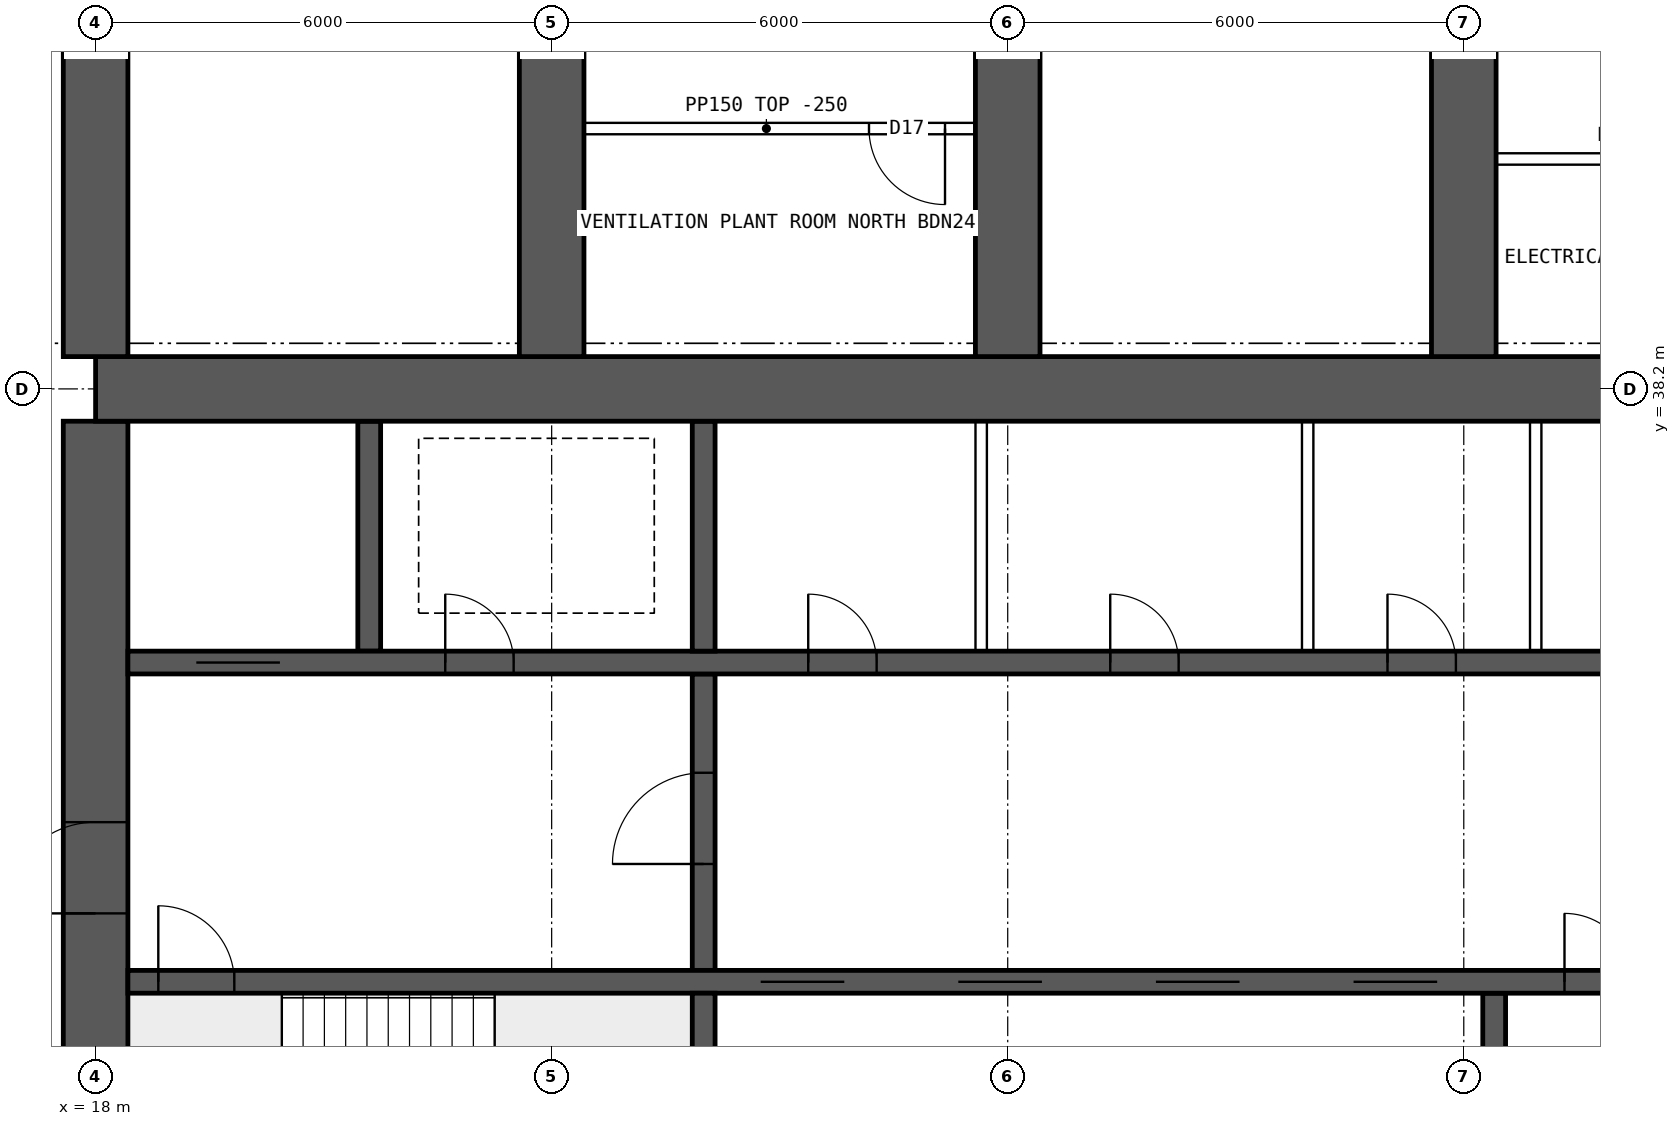
"""IFC4 building model, lengths in metres.
Left out: names, types, materials, properties, quantities, classifications, styles, units other than length and angle.
Written with IfcOpenShell. Run it as: python <this file> out.ifc"""

import sys

from ifc_helpers import new_model, si_unit, direction, frame, frame_2d, origin, place, context, subcontext, project, spatial, rectangle, extrude, element, fill, save


model = new_model("IFC4")
c1 = context("Model", 3, precision=1e-05, world=origin(), true_north=direction((0.0, 1.0)))
c2 = subcontext(c1, "Body", "Model", "MODEL_VIEW")
j1 = project(units=[si_unit("LENGTHUNIT", "METRE"), si_unit("PLANEANGLEUNIT", "RADIAN")], contexts=[c1])
p1 = place(None, origin())
s1 = spatial("IfcSite", under=j1, at=p1, CompositionType="ELEMENT")
p2 = place(p1, origin())
s2 = spatial("IfcBuilding", under=s1, at=p2, CompositionType="ELEMENT")
p3 = place(p2, frame((0.0, 0.0, 152.35)))
s3 = spatial("IfcBuildingStorey", under=s2, at=p3, CompositionType="ELEMENT", Elevation=152.35)
p4 = place(p3, frame((18.0, 38.2, 0.0), z_axis=(0.0, 0.0, 1.0), x_axis=(1.0, 0.0, 0.0)))
e1 = element("IfcWall", 1, at=p4, inside=s3, PredefinedType="SHEAR", context=c2, shape_type="SweptSolid", body=[
    extrude(rectangle(XDim=48.0, YDim=0.85, at=frame_2d((24.0, 0.0))), origin(), (0.0, 0.0, 1.0), 3.75),
])
p5 = place(p3, frame((18.0, 26.225, 0.0), z_axis=(0.0, 0.0, 1.0), x_axis=(0.0, 1.0, 0.0)))
e2 = element("IfcWall", 2, at=p5, inside=s3, PredefinedType="SHEAR", context=c2, shape_type="SweptSolid", body=[
    extrude(rectangle(XDim=11.55, YDim=0.85, at=frame_2d((5.775, 0.0))), origin(), (0.0, 0.0, 1.0), 3.75),
])
p6 = place(p5, frame((5.075, 0.0, 0.0)))
e3 = element("IfcOpeningElement", 3, at=p6, cuts=e2, PredefinedType="OPENING", context=c2, shape_type="SweptSolid", body=[
    extrude(rectangle(XDim=1.2, YDim=2.1, at=frame_2d((0.6, 1.05))), frame((0.0, 0.435, 0.0), z_axis=(0.0, -1.0, 0.0), x_axis=(1.0, 0.0, 0.0)), (0.0, 0.0, 1.0), 0.87),
])
p7 = place(p3, frame((18.425, 30.4, 0.0), z_axis=(0.0, 0.0, 1.0), x_axis=(1.0, 0.0, 0.0)))
e4 = element("IfcWall", 4, at=p7, inside=s3, PredefinedType="SHEAR", context=c2, shape_type="SweptSolid", body=[
    extrude(rectangle(XDim=47.15, YDim=0.3, at=frame_2d((23.575, 0.0))), origin(), (0.0, 0.0, 1.0), 3.75),
])
p8 = place(p7, frame((0.4, 0.0, 0.0)))
e5 = element("IfcOpeningElement", 5, at=p8, cuts=e4, PredefinedType="OPENING", context=c2, shape_type="SweptSolid", body=[
    extrude(rectangle(XDim=1.0, YDim=2.1, at=frame_2d((0.5, 1.05))), frame((0.0, 0.16, 0.0), z_axis=(0.0, -1.0, 0.0), x_axis=(1.0, 0.0, 0.0)), (0.0, 0.0, 1.0), 0.32),
])
p9 = place(p7, frame((45.75, 0.0, 0.0)))
e6 = element("IfcOpeningElement", 6, at=p9, cuts=e4, PredefinedType="OPENING", context=c2, shape_type="SweptSolid", body=[
    extrude(rectangle(XDim=1.0, YDim=2.1, at=frame_2d((0.5, 1.05))), frame((0.0, 0.16, 0.0), z_axis=(0.0, -1.0, 0.0), x_axis=(1.0, 0.0, 0.0)), (0.0, 0.0, 1.0), 0.32),
])
p10 = place(p7, frame((8.325, 0.0, 0.0)))
e7 = element("IfcOpeningElement", 7, at=p10, cuts=e4, PredefinedType="OPENING", context=c2, shape_type="SweptSolid", body=[
    extrude(rectangle(XDim=1.1, YDim=2.1, at=frame_2d((0.55, 1.05))), frame((0.0, 0.16, 0.0), z_axis=(0.0, -1.0, 0.0), x_axis=(1.0, 0.0, 0.0)), (0.0, 0.0, 1.0), 0.32),
])
p11 = place(p7, frame((10.925, 0.0, 0.0)))
e8 = element("IfcOpeningElement", 8, at=p11, cuts=e4, PredefinedType="OPENING", context=c2, shape_type="SweptSolid", body=[
    extrude(rectangle(XDim=1.1, YDim=2.1, at=frame_2d((0.55, 1.05))), frame((0.0, 0.16, 0.0), z_axis=(0.0, -1.0, 0.0), x_axis=(1.0, 0.0, 0.0)), (0.0, 0.0, 1.0), 0.32),
])
p12 = place(p7, frame((13.525, 0.0, 0.0)))
e9 = element("IfcOpeningElement", 9, at=p12, cuts=e4, PredefinedType="OPENING", context=c2, shape_type="SweptSolid", body=[
    extrude(rectangle(XDim=1.1, YDim=2.1, at=frame_2d((0.55, 1.05))), frame((0.0, 0.16, 0.0), z_axis=(0.0, -1.0, 0.0), x_axis=(1.0, 0.0, 0.0)), (0.0, 0.0, 1.0), 0.32),
])
p13 = place(p7, frame((16.125, 0.0, 0.0)))
e10 = element("IfcOpeningElement", 10, at=p13, cuts=e4, PredefinedType="OPENING", context=c2, shape_type="SweptSolid", body=[
    extrude(rectangle(XDim=1.1, YDim=2.1, at=frame_2d((0.55, 1.05))), frame((0.0, 0.16, 0.0), z_axis=(0.0, -1.0, 0.0), x_axis=(1.0, 0.0, 0.0)), (0.0, 0.0, 1.0), 0.32),
])
p14 = place(p7, frame((18.9, 0.0, 0.0)))
e11 = element("IfcOpeningElement", 11, at=p14, cuts=e4, PredefinedType="OPENING", context=c2, shape_type="SweptSolid", body=[
    extrude(rectangle(XDim=0.9, YDim=2.1, at=frame_2d((0.45, 1.05))), frame((0.0, 0.16, 0.0), z_axis=(0.0, -1.0, 0.0), x_axis=(1.0, 0.0, 0.0)), (0.0, 0.0, 1.0), 0.32),
])
p15 = place(p7, frame((30.192, 0.0, 0.0)))
e12 = element("IfcOpeningElement", 12, at=p15, cuts=e4, PredefinedType="OPENING", context=c2, shape_type="SweptSolid", body=[
    extrude(rectangle(XDim=1.1, YDim=2.1, at=frame_2d((0.55, 1.05))), frame((0.0, 0.16, 0.0), z_axis=(0.0, -1.0, 0.0), x_axis=(1.0, 0.0, 0.0)), (0.0, 0.0, 1.0), 0.32),
])
p16 = place(p7, frame((33.725, 0.0, 0.0)))
e13 = element("IfcOpeningElement", 13, at=p16, cuts=e4, PredefinedType="OPENING", context=c2, shape_type="SweptSolid", body=[
    extrude(rectangle(XDim=1.1, YDim=2.1, at=frame_2d((0.55, 1.05))), frame((0.0, 0.16, 0.0), z_axis=(0.0, -1.0, 0.0), x_axis=(1.0, 0.0, 0.0)), (0.0, 0.0, 1.0), 0.32),
])
p17 = place(p7, frame((37.258, 0.0, 0.0)))
e14 = element("IfcOpeningElement", 14, at=p17, cuts=e4, PredefinedType="OPENING", context=c2, shape_type="SweptSolid", body=[
    extrude(rectangle(XDim=1.1, YDim=2.1, at=frame_2d((0.55, 1.05))), frame((0.0, 0.16, 0.0), z_axis=(0.0, -1.0, 0.0), x_axis=(1.0, 0.0, 0.0)), (0.0, 0.0, 1.0), 0.32),
])
p18 = place(p3, frame((18.425, 34.6, 0.0), z_axis=(0.0, 0.0, 1.0), x_axis=(1.0, 0.0, 0.0)))
e15 = element("IfcWall", 15, at=p18, inside=s3, PredefinedType="SHEAR", context=c2, shape_type="SweptSolid", body=[
    extrude(rectangle(XDim=47.15, YDim=0.3, at=frame_2d((23.575, 0.0))), origin(), (0.0, 0.0, 1.0), 3.75),
])
p19 = place(p18, frame((0.9, 0.0, 0.0)))
e16 = element("IfcOpeningElement", 16, at=p19, cuts=e15, PredefinedType="OPENING", context=c2, shape_type="SweptSolid", body=[
    extrude(rectangle(XDim=1.1, YDim=2.1, at=frame_2d((0.55, 1.05))), frame((0.0, 0.16, 0.0), z_axis=(0.0, -1.0, 0.0), x_axis=(1.0, 0.0, 0.0)), (0.0, 0.0, 1.0), 0.32),
])
p20 = place(p18, frame((45.15, 0.0, 0.0)))
e17 = element("IfcOpeningElement", 17, at=p20, cuts=e15, PredefinedType="OPENING", context=c2, shape_type="SweptSolid", body=[
    extrude(rectangle(XDim=1.1, YDim=2.1, at=frame_2d((0.55, 1.05))), frame((0.0, 0.16, 0.0), z_axis=(0.0, -1.0, 0.0), x_axis=(1.0, 0.0, 0.0)), (0.0, 0.0, 1.0), 0.32),
])
p21 = place(p18, frame((4.175, 0.0, 0.0)))
e18 = element("IfcOpeningElement", 18, at=p21, cuts=e15, PredefinedType="OPENING", context=c2, shape_type="SweptSolid", body=[
    extrude(rectangle(XDim=0.9, YDim=2.1, at=frame_2d((0.45, 1.05))), frame((0.0, 0.16, 0.0), z_axis=(0.0, -1.0, 0.0), x_axis=(1.0, 0.0, 0.0)), (0.0, 0.0, 1.0), 0.32),
])
p22 = place(p18, frame((42.075, 0.0, 0.0)))
e19 = element("IfcOpeningElement", 19, at=p22, cuts=e15, PredefinedType="OPENING", context=c2, shape_type="SweptSolid", body=[
    extrude(rectangle(XDim=0.9, YDim=2.1, at=frame_2d((0.45, 1.05))), frame((0.0, 0.16, 0.0), z_axis=(0.0, -1.0, 0.0), x_axis=(1.0, 0.0, 0.0)), (0.0, 0.0, 1.0), 0.32),
])
p23 = place(p18, frame((8.95, 0.0, 0.0)))
e20 = element("IfcOpeningElement", 20, at=p23, cuts=e15, PredefinedType="OPENING", context=c2, shape_type="SweptSolid", body=[
    extrude(rectangle(XDim=0.9, YDim=2.1, at=frame_2d((0.45, 1.05))), frame((0.0, 0.16, 0.0), z_axis=(0.0, -1.0, 0.0), x_axis=(1.0, 0.0, 0.0)), (0.0, 0.0, 1.0), 0.32),
])
p24 = place(p18, frame((12.924, 0.0, 0.0)))
e21 = element("IfcOpeningElement", 21, at=p24, cuts=e15, PredefinedType="OPENING", context=c2, shape_type="SweptSolid", body=[
    extrude(rectangle(XDim=0.9, YDim=2.1, at=frame_2d((0.45, 1.05))), frame((0.0, 0.16, 0.0), z_axis=(0.0, -1.0, 0.0), x_axis=(1.0, 0.0, 0.0)), (0.0, 0.0, 1.0), 0.32),
])
p25 = place(p18, frame((16.571, 0.0, 0.0)))
e22 = element("IfcOpeningElement", 22, at=p25, cuts=e15, PredefinedType="OPENING", context=c2, shape_type="SweptSolid", body=[
    extrude(rectangle(XDim=0.9, YDim=2.1, at=frame_2d((0.45, 1.05))), frame((0.0, 0.16, 0.0), z_axis=(0.0, -1.0, 0.0), x_axis=(1.0, 0.0, 0.0)), (0.0, 0.0, 1.0), 0.32),
])
p26 = place(p18, frame((20.33, 0.0, 0.0)))
e23 = element("IfcOpeningElement", 23, at=p26, cuts=e15, PredefinedType="OPENING", context=c2, shape_type="SweptSolid", body=[
    extrude(rectangle(XDim=0.9, YDim=2.1, at=frame_2d((0.45, 1.05))), frame((0.0, 0.16, 0.0), z_axis=(0.0, -1.0, 0.0), x_axis=(1.0, 0.0, 0.0)), (0.0, 0.0, 1.0), 0.32),
])
p27 = place(p18, frame((24.736, 0.0, 0.0)))
e24 = element("IfcOpeningElement", 24, at=p27, cuts=e15, PredefinedType="OPENING", context=c2, shape_type="SweptSolid", body=[
    extrude(rectangle(XDim=0.9, YDim=2.1, at=frame_2d((0.45, 1.05))), frame((0.0, 0.16, 0.0), z_axis=(0.0, -1.0, 0.0), x_axis=(1.0, 0.0, 0.0)), (0.0, 0.0, 1.0), 0.32),
])
p28 = place(p18, frame((27.533, 0.0, 0.0)))
e25 = element("IfcOpeningElement", 25, at=p28, cuts=e15, PredefinedType="OPENING", context=c2, shape_type="SweptSolid", body=[
    extrude(rectangle(XDim=0.9, YDim=2.1, at=frame_2d((0.45, 1.05))), frame((0.0, 0.16, 0.0), z_axis=(0.0, -1.0, 0.0), x_axis=(1.0, 0.0, 0.0)), (0.0, 0.0, 1.0), 0.32),
])
p29 = place(p18, frame((29.703, 0.0, 0.0)))
e26 = element("IfcOpeningElement", 26, at=p29, cuts=e15, PredefinedType="OPENING", context=c2, shape_type="SweptSolid", body=[
    extrude(rectangle(XDim=0.9, YDim=2.1, at=frame_2d((0.45, 1.05))), frame((0.0, 0.16, 0.0), z_axis=(0.0, -1.0, 0.0), x_axis=(1.0, 0.0, 0.0)), (0.0, 0.0, 1.0), 0.32),
])
p30 = place(p18, frame((33.502, 0.0, 0.0)))
e27 = element("IfcOpeningElement", 27, at=p30, cuts=e15, PredefinedType="OPENING", context=c2, shape_type="SweptSolid", body=[
    extrude(rectangle(XDim=0.9, YDim=2.1, at=frame_2d((0.45, 1.05))), frame((0.0, 0.16, 0.0), z_axis=(0.0, -1.0, 0.0), x_axis=(1.0, 0.0, 0.0)), (0.0, 0.0, 1.0), 0.32),
])
p31 = place(p18, frame((37.453, 0.0, 0.0)))
e28 = element("IfcOpeningElement", 28, at=p31, cuts=e15, PredefinedType="OPENING", context=c2, shape_type="SweptSolid", body=[
    extrude(rectangle(XDim=0.9, YDim=2.1, at=frame_2d((0.45, 1.05))), frame((0.0, 0.16, 0.0), z_axis=(0.0, -1.0, 0.0), x_axis=(1.0, 0.0, 0.0)), (0.0, 0.0, 1.0), 0.32),
])
p32 = place(p3, frame((26.0, 26.225, 0.0), z_axis=(0.0, 0.0, 1.0), x_axis=(0.0, 1.0, 0.0)))
e29 = element("IfcWall", 29, at=p32, inside=s3, PredefinedType="SHEAR", context=c2, shape_type="SweptSolid", body=[
    extrude(rectangle(XDim=4.025, YDim=0.3, at=frame_2d((2.012, 0.0))), origin(), (0.0, 0.0, 1.0), 3.75),
])
p33 = place(p3, frame((26.0, 30.55, 0.0), z_axis=(0.0, 0.0, 1.0), x_axis=(0.0, 1.0, 0.0)))
e30 = element("IfcWall", 30, at=p33, inside=s3, PredefinedType="SHEAR", context=c2, shape_type="SweptSolid", body=[
    extrude(rectangle(XDim=3.9, YDim=0.3, at=frame_2d((1.95, 0.0))), origin(), (0.0, 0.0, 1.0), 3.75),
])
p34 = place(p33, frame((1.4, 0.0, 0.0)))
e31 = element("IfcOpeningElement", 31, at=p34, cuts=e30, PredefinedType="OPENING", context=c2, shape_type="SweptSolid", body=[
    extrude(rectangle(XDim=1.2, YDim=2.1, at=frame_2d((0.6, 1.05))), frame((0.0, 0.16, 0.0), z_axis=(0.0, -1.0, 0.0), x_axis=(1.0, 0.0, 0.0)), (0.0, 0.0, 1.0), 0.32),
])
for number, where, z_axis, x_axis in (
    (32, (21.6, 34.75, 0.0), (0.0, 0.0, 1.0), (0.0, 1.0, 0.0)),
    (33, (26.0, 34.75, 0.0), (0.0, 0.0, 1.0), (0.0, 1.0, 0.0)),
):
    element("IfcWall", number, at=place(p3, frame(where, z_axis=z_axis, x_axis=x_axis)), inside=s3, PredefinedType="SHEAR", context=c2, shape_type="SweptSolid", body=[
        extrude(rectangle(XDim=3.025, YDim=0.3, at=frame_2d((1.512, 0.0))), origin(), (0.0, 0.0, 1.0), 3.75),
    ])
p35 = place(p3, frame((36.4, 26.225, 0.0), z_axis=(0.0, 0.0, 1.0), x_axis=(0.0, 1.0, 0.0)))
e34 = element("IfcWall", 34, at=p35, inside=s3, PredefinedType="SHEAR", context=c2, shape_type="SweptSolid", body=[
    extrude(rectangle(XDim=4.025, YDim=0.3, at=frame_2d((2.012, 0.0))), origin(), (0.0, 0.0, 1.0), 3.75),
])
for number, where, z_axis, x_axis in (
    (35, (18.0, 38.625, 0.0), (0.0, 0.0, 1.0), (0.0, 1.0, 0.0)),
    (36, (24.0, 38.625, 0.0), (0.0, 0.0, 1.0), (0.0, 1.0, 0.0)),
    (37, (30.0, 38.625, 0.0), (0.0, 0.0, 1.0), (0.0, 1.0, 0.0)),
    (38, (36.0, 38.625, 0.0), (0.0, 0.0, 1.0), (0.0, 1.0, 0.0)),
):
    element("IfcWall", number, at=place(p3, frame(where, z_axis=z_axis, x_axis=x_axis)), inside=s3, PredefinedType="SHEAR", context=c2, shape_type="SweptSolid", body=[
        extrude(rectangle(XDim=8.175, YDim=0.85, at=frame_2d((4.087, 0.0))), origin(), (0.0, 0.0, 1.0), 3.75),
    ])
for number, where, z_axis, x_axis in (
    (39, (29.651, 34.75, 0.0), (0.0, 0.0, 1.0), (0.0, 1.0, 0.0)),
    (40, (33.946, 34.75, 0.0), (0.0, 0.0, 1.0), (0.0, 1.0, 0.0)),
    (41, (36.946, 34.75, 0.0), (0.0, 0.0, 1.0), (0.0, 1.0, 0.0)),
):
    element("IfcWall", number, at=place(p3, frame(where, z_axis=z_axis, x_axis=x_axis)), inside=s3, PredefinedType="SOLIDWALL", context=c2, shape_type="SweptSolid", body=[
        extrude(rectangle(XDim=3.025, YDim=0.15, at=frame_2d((1.512, 0.0))), origin(), (0.0, 0.0, 1.0), 3.5),
    ])
p36 = place(p3, frame((29.575, 41.625, 0.0), z_axis=(0.0, 0.0, 1.0), x_axis=(-1.0, 0.0, 0.0)))
e42 = element("IfcWall", 42, at=p36, inside=s3, PredefinedType="PARTITIONING", context=c2, shape_type="SweptSolid", body=[
    extrude(rectangle(XDim=5.5, YDim=0.15, at=frame_2d((2.75, 0.0))), origin(), (0.0, 0.0, 1.0), 3.5),
])
p37 = place(p36, frame((0.4, 0.0, 0.0)))
e43 = element("IfcOpeningElement", 43, at=p37, cuts=e42, PredefinedType="OPENING", context=c2, shape_type="SweptSolid", body=[
    extrude(rectangle(XDim=1.0, YDim=2.1, at=frame_2d((0.5, 1.05))), frame((0.0, 0.085, 0.0), z_axis=(0.0, -1.0, 0.0), x_axis=(1.0, 0.0, 0.0)), (0.0, 0.0, 1.0), 0.17),
])
p38 = place(p3, frame((41.575, 41.225, 0.0), z_axis=(0.0, 0.0, 1.0), x_axis=(-1.0, 0.0, 0.0)))
e44 = element("IfcWall", 44, at=p38, inside=s3, PredefinedType="PARTITIONING", context=c2, shape_type="SweptSolid", body=[
    extrude(rectangle(XDim=5.5, YDim=0.15, at=frame_2d((2.75, 0.0))), origin(), (0.0, 0.0, 1.0), 3.5),
])
p39 = place(p38, frame((0.4, 0.0, 0.0)))
e45 = element("IfcOpeningElement", 45, at=p39, cuts=e44, PredefinedType="OPENING", context=c2, shape_type="SweptSolid", body=[
    extrude(rectangle(XDim=1.0, YDim=2.1, at=frame_2d((0.5, 1.05))), frame((0.0, 0.085, 0.0), z_axis=(0.0, -1.0, 0.0), x_axis=(1.0, 0.0, 0.0)), (0.0, 0.0, 1.0), 0.17),
])
p40 = place(p6, origin())
e46 = element("IfcDoor", 46, at=p40, inside=s3, OperationType="SINGLE_SWING_LEFT", PredefinedType="DOOR", context=c2, shape_type="SweptSolid", body=[
    extrude(rectangle(XDim=1.2, YDim=2.1, at=frame_2d((0.6, 1.05))), frame((0.0, 0.025, 0.0), z_axis=(0.0, -1.0, 0.0), x_axis=(1.0, 0.0, 0.0)), (0.0, 0.0, 1.0), 0.05),
])
fill(e3, e46)
p41 = place(p8, origin())
e47 = element("IfcDoor", 47, at=p41, inside=s3, OperationType="SINGLE_SWING_LEFT", PredefinedType="DOOR", context=c2, shape_type="SweptSolid", body=[
    extrude(rectangle(XDim=1.0, YDim=2.1, at=frame_2d((0.5, 1.05))), frame((0.0, 0.025, 0.0), z_axis=(0.0, -1.0, 0.0), x_axis=(1.0, 0.0, 0.0)), (0.0, 0.0, 1.0), 0.05),
])
fill(e5, e47)
p42 = place(p19, origin())
e48 = element("IfcDoor", 48, at=p42, inside=s3, OperationType="DOUBLE_DOOR_SLIDING", PredefinedType="DOOR", context=c2, shape_type="SweptSolid", body=[
    extrude(rectangle(XDim=1.1, YDim=2.1, at=frame_2d((0.55, 1.05))), frame((0.0, 0.025, 0.0), z_axis=(0.0, -1.0, 0.0), x_axis=(1.0, 0.0, 0.0)), (0.0, 0.0, 1.0), 0.05),
])
fill(e16, e48)
p43 = place(p21, origin())
e49 = element("IfcDoor", 49, at=p43, inside=s3, OperationType="SINGLE_SWING_LEFT", PredefinedType="DOOR", context=c2, shape_type="SweptSolid", body=[
    extrude(rectangle(XDim=0.9, YDim=2.1, at=frame_2d((0.45, 1.05))), frame((0.0, 0.025, 0.0), z_axis=(0.0, -1.0, 0.0), x_axis=(1.0, 0.0, 0.0)), (0.0, 0.0, 1.0), 0.05),
])
fill(e18, e49)
p44 = place(p34, origin())
e50 = element("IfcDoor", 50, at=p44, inside=s3, OperationType="SINGLE_SWING_LEFT", PredefinedType="DOOR", context=c2, shape_type="SweptSolid", body=[
    extrude(rectangle(XDim=1.2, YDim=2.1, at=frame_2d((0.6, 1.05))), frame((0.0, 0.025, 0.0), z_axis=(0.0, -1.0, 0.0), x_axis=(1.0, 0.0, 0.0)), (0.0, 0.0, 1.0), 0.05),
])
fill(e31, e50)
p45 = place(p23, origin())
e51 = element("IfcDoor", 51, at=p45, inside=s3, OperationType="SINGLE_SWING_LEFT", PredefinedType="DOOR", context=c2, shape_type="SweptSolid", body=[
    extrude(rectangle(XDim=0.9, YDim=2.1, at=frame_2d((0.45, 1.05))), frame((0.0, 0.025, 0.0), z_axis=(0.0, -1.0, 0.0), x_axis=(1.0, 0.0, 0.0)), (0.0, 0.0, 1.0), 0.05),
])
fill(e20, e51)
p46 = place(p24, origin())
e52 = element("IfcDoor", 52, at=p46, inside=s3, OperationType="SINGLE_SWING_LEFT", PredefinedType="DOOR", context=c2, shape_type="SweptSolid", body=[
    extrude(rectangle(XDim=0.9, YDim=2.1, at=frame_2d((0.45, 1.05))), frame((0.0, 0.025, 0.0), z_axis=(0.0, -1.0, 0.0), x_axis=(1.0, 0.0, 0.0)), (0.0, 0.0, 1.0), 0.05),
])
fill(e21, e52)
p47 = place(p25, origin())
e53 = element("IfcDoor", 53, at=p47, inside=s3, OperationType="SINGLE_SWING_LEFT", PredefinedType="DOOR", context=c2, shape_type="SweptSolid", body=[
    extrude(rectangle(XDim=0.9, YDim=2.1, at=frame_2d((0.45, 1.05))), frame((0.0, 0.025, 0.0), z_axis=(0.0, -1.0, 0.0), x_axis=(1.0, 0.0, 0.0)), (0.0, 0.0, 1.0), 0.05),
])
fill(e22, e53)
p48 = place(p10, origin())
e54 = element("IfcDoor", 54, at=p48, inside=s3, OperationType="DOUBLE_DOOR_SLIDING", PredefinedType="DOOR", context=c2, shape_type="SweptSolid", body=[
    extrude(rectangle(XDim=1.1, YDim=2.1, at=frame_2d((0.55, 1.05))), frame((0.0, 0.025, 0.0), z_axis=(0.0, -1.0, 0.0), x_axis=(1.0, 0.0, 0.0)), (0.0, 0.0, 1.0), 0.05),
])
fill(e7, e54)
p49 = place(p11, origin())
e55 = element("IfcDoor", 55, at=p49, inside=s3, OperationType="DOUBLE_DOOR_SLIDING", PredefinedType="DOOR", context=c2, shape_type="SweptSolid", body=[
    extrude(rectangle(XDim=1.1, YDim=2.1, at=frame_2d((0.55, 1.05))), frame((0.0, 0.025, 0.0), z_axis=(0.0, -1.0, 0.0), x_axis=(1.0, 0.0, 0.0)), (0.0, 0.0, 1.0), 0.05),
])
fill(e8, e55)
p50 = place(p12, origin())
e56 = element("IfcDoor", 56, at=p50, inside=s3, OperationType="DOUBLE_DOOR_SLIDING", PredefinedType="DOOR", context=c2, shape_type="SweptSolid", body=[
    extrude(rectangle(XDim=1.1, YDim=2.1, at=frame_2d((0.55, 1.05))), frame((0.0, 0.025, 0.0), z_axis=(0.0, -1.0, 0.0), x_axis=(1.0, 0.0, 0.0)), (0.0, 0.0, 1.0), 0.05),
])
fill(e9, e56)
p51 = place(p13, origin())
e57 = element("IfcDoor", 57, at=p51, inside=s3, OperationType="DOUBLE_DOOR_SLIDING", PredefinedType="DOOR", context=c2, shape_type="SweptSolid", body=[
    extrude(rectangle(XDim=1.1, YDim=2.1, at=frame_2d((0.55, 1.05))), frame((0.0, 0.025, 0.0), z_axis=(0.0, -1.0, 0.0), x_axis=(1.0, 0.0, 0.0)), (0.0, 0.0, 1.0), 0.05),
])
fill(e10, e57)
p52 = place(p14, origin())
e58 = element("IfcDoor", 58, at=p52, inside=s3, OperationType="SINGLE_SWING_LEFT", PredefinedType="DOOR", context=c2, shape_type="SweptSolid", body=[
    extrude(rectangle(XDim=0.9, YDim=2.1, at=frame_2d((0.45, 1.05))), frame((0.0, 0.025, 0.0), z_axis=(0.0, -1.0, 0.0), x_axis=(1.0, 0.0, 0.0)), (0.0, 0.0, 1.0), 0.05),
])
fill(e11, e58)
p53 = place(p37, origin())
e59 = element("IfcDoor", 59, at=p53, inside=s3, OperationType="SINGLE_SWING_LEFT", PredefinedType="DOOR", context=c2, shape_type="SweptSolid", body=[
    extrude(rectangle(XDim=1.0, YDim=2.1, at=frame_2d((0.5, 1.05))), frame((0.0, 0.025, 0.0), z_axis=(0.0, -1.0, 0.0), x_axis=(1.0, 0.0, 0.0)), (0.0, 0.0, 1.0), 0.05),
])
fill(e43, e59)
save(model, sys.argv[1])
